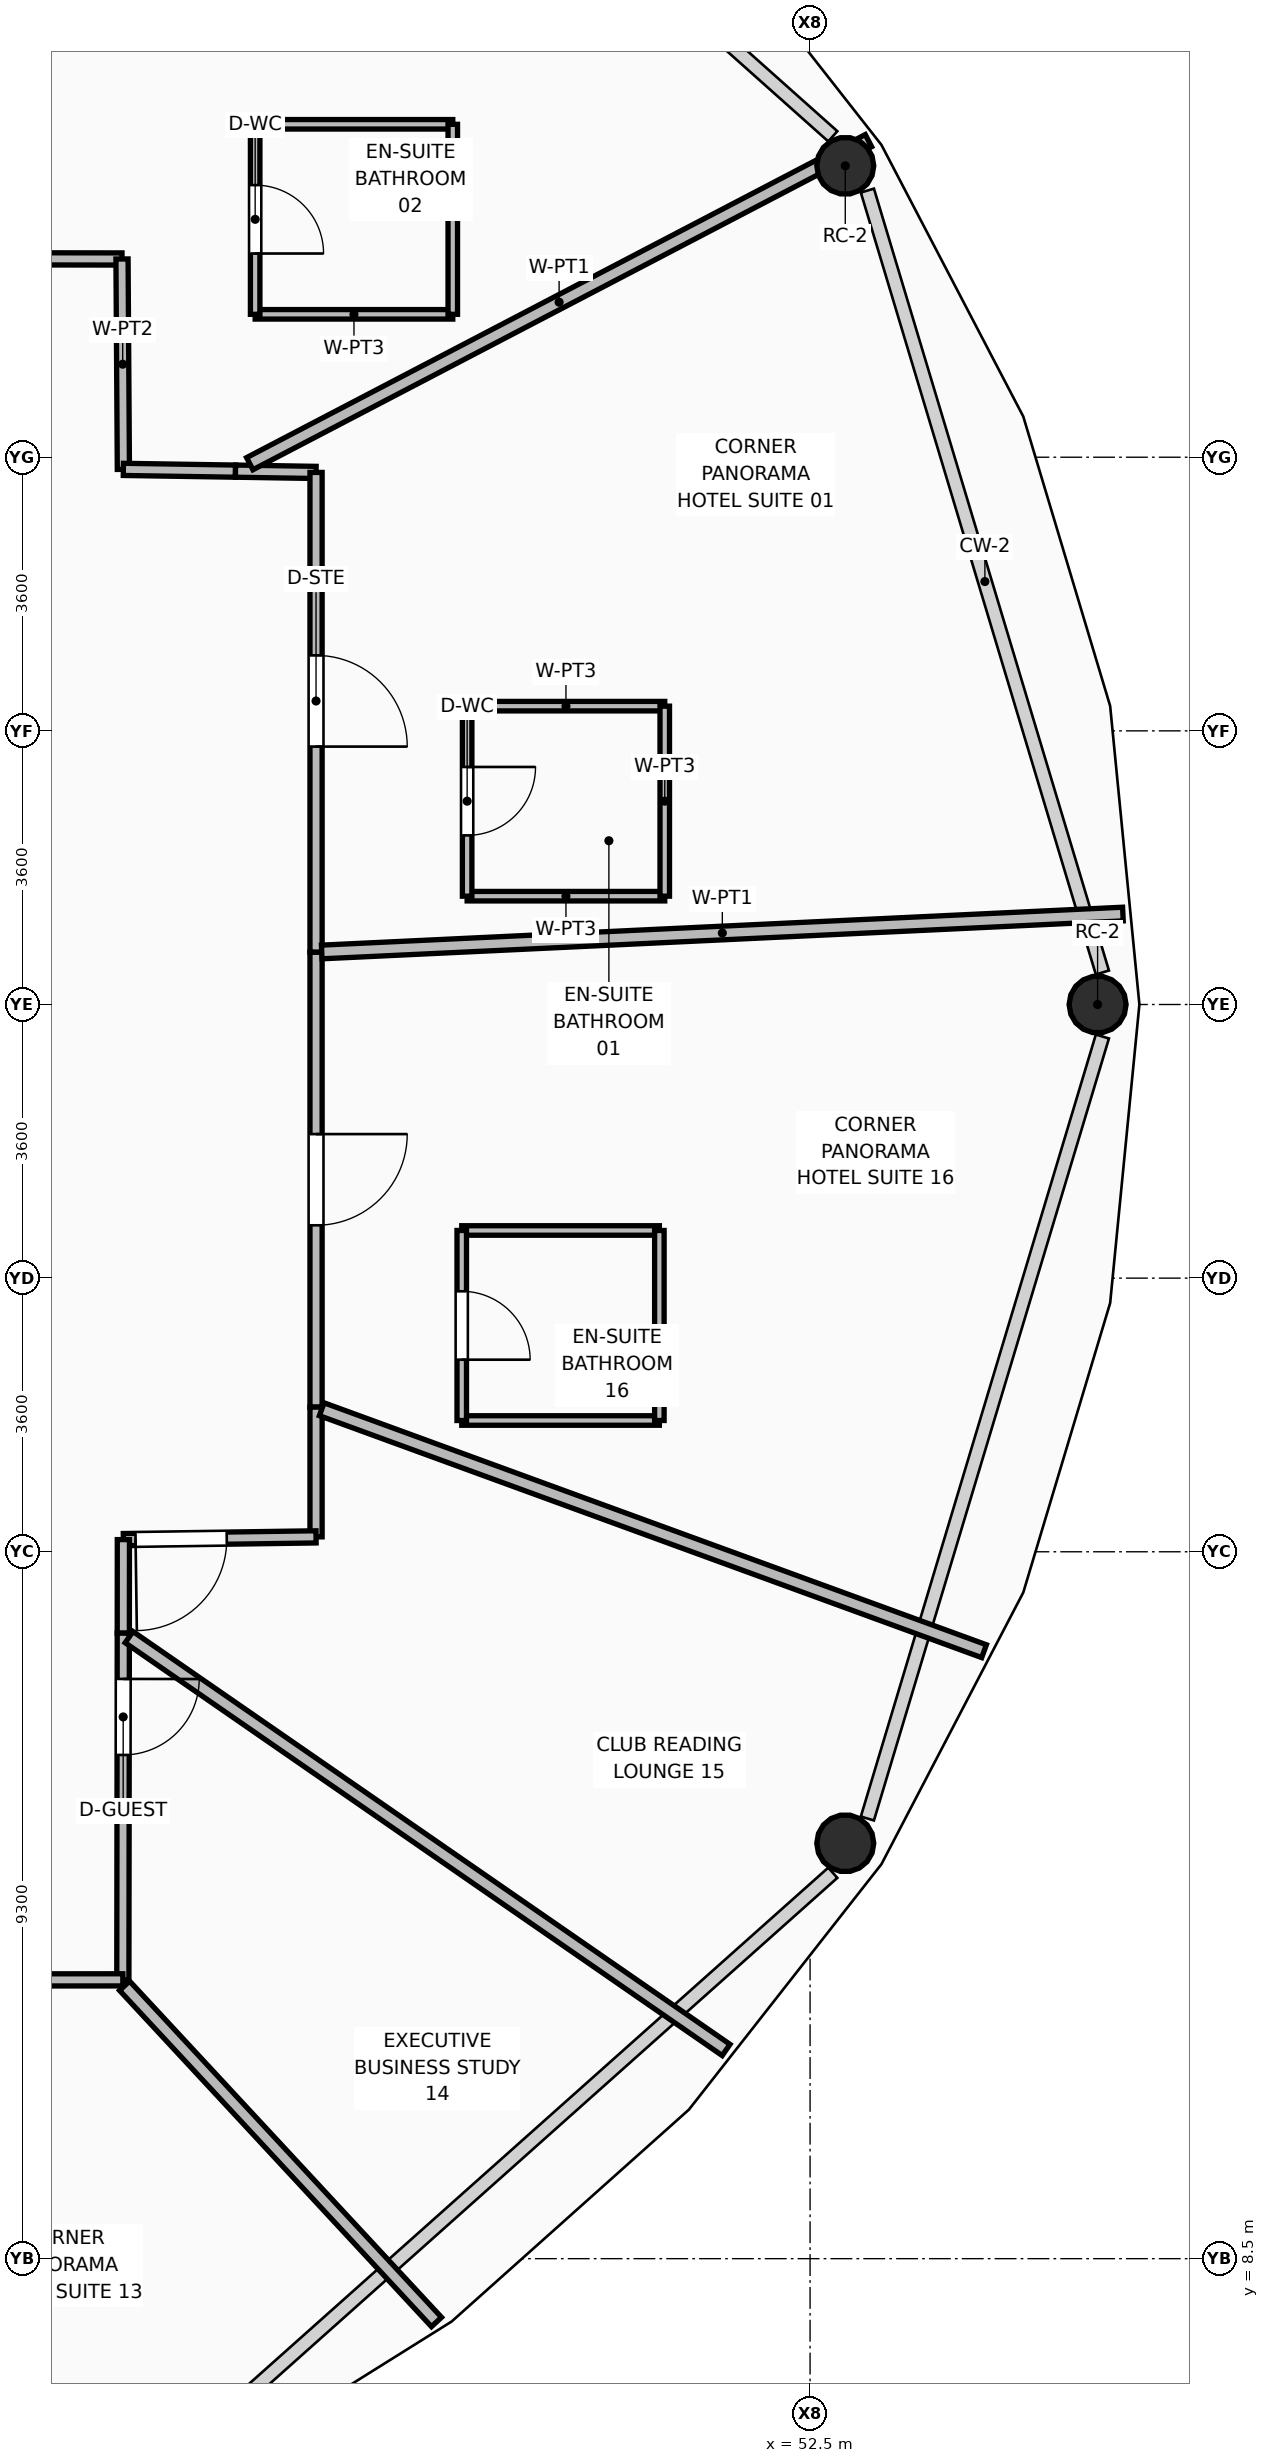
"""IFC4 building model, lengths in metres.
Left out: names, types, materials, properties, quantities, classifications, styles, units other than length and angle.
Written with IfcOpenShell. Run it as: python <this file> out.ifc"""

import sys

from ifc_helpers import new_model, si_unit, direction, frame, frame_2d, origin, origin_2d, place, context, subcontext, project, spatial, rectangle, hollow_circle, extrude, element, fill, save


model = new_model("IFC4")
c1 = context("Model", 3, precision=1e-05, world=origin(), true_north=direction((0.0, 1.0)))
c2 = subcontext(c1, "Body", "Model", "MODEL_VIEW")
j1 = project(units=[si_unit("LENGTHUNIT", "METRE"), si_unit("PLANEANGLEUNIT", "RADIAN")], contexts=[c1])
p1 = place(None, origin())
s1 = spatial("IfcSite", under=j1, at=p1, CompositionType="ELEMENT")
p2 = place(p1, origin())
s2 = spatial("IfcBuilding", under=s1, at=p2, CompositionType="ELEMENT")
p3 = place(p2, frame((0.0, 0.0, 157.2)))
s3 = spatial("IfcBuildingStorey", under=s2, at=p3, CompositionType="ELEMENT", Elevation=157.2)
for number, where, z_axis, x_axis in (
    (1, (56.283, 25.0, 0.0), (0.0, 0.0, 1.0), (1.0, 0.0, 0.0)),
    (2, (52.963, 36.034, 0.0), (0.0, 0.0, 1.0), (1.0, 0.0, 0.0)),
    (3, (52.963, 13.965, 0.0), (0.0, 0.0, 1.0), (1.0, 0.0, 0.0)),
):
    element("IfcColumn", number, at=place(p3, frame(where, z_axis=z_axis, x_axis=x_axis)), inside=s3, PredefinedType="COLUMN", context=c2, shape_type="SweptSolid", body=[
        extrude(hollow_circle(Radius=0.375, WallThickness=0.035, at=origin_2d()), origin(), (0.0, 0.0, 1.0), 3.57),
    ])
p4 = place(p3, frame((38.54, 34.815, 0.0), z_axis=(0.0, 0.0, 1.0), x_axis=(0.999999029632, -0.001393102783, 0.0)))
e4 = element("IfcWall", 4, at=p4, inside=s3, PredefinedType="PARTITIONING", context=c2, shape_type="SweptSolid", body=[
    extrude(rectangle(XDim=4.907, YDim=0.16, at=frame_2d((2.454, 0.0))), origin(), (0.0, 0.0, 1.0), 3.006),
])
p5 = place(p4, frame((0.16, 0.0, 0.0)))
e5 = element("IfcOpeningElement", 5, at=p5, cuts=e4, PredefinedType="OPENING", context=c2, shape_type="SweptSolid", body=[
    extrude(rectangle(XDim=1.2, YDim=2.1, at=frame_2d((0.6, 1.05))), frame((0.0, 0.09, 0.0), z_axis=(0.0, -1.0, 0.0), x_axis=(1.0, 0.0, 0.0)), (0.0, 0.0, 1.0), 0.18),
])
p6 = place(p3, frame((43.447, 34.808, 0.0), z_axis=(0.0, 0.0, 1.0), x_axis=(0.006526585281, -0.999978701615, 0.0)))
e6 = element("IfcWall", 6, at=p6, inside=s3, PredefinedType="PARTITIONING", context=c2, shape_type="SweptSolid", body=[
    extrude(rectangle(XDim=2.768, YDim=0.16, at=frame_2d((1.384, 0.0))), origin(), (0.0, 0.0, 1.0), 3.006),
])
p7 = place(p3, frame((43.465, 32.04, 0.0), z_axis=(0.0, 0.0, 1.0), x_axis=(0.999878959925, -0.015558454268, 0.0)))
e7 = element("IfcWall", 7, at=p7, inside=s3, PredefinedType="PARTITIONING", context=c2, shape_type="SweptSolid", body=[
    extrude(rectangle(XDim=1.475, YDim=0.16, at=frame_2d((0.738, 0.0))), origin(), (0.0, 0.0, 1.0), 3.55),
])
p8 = place(p3, frame((44.94, 32.017, 0.0), z_axis=(0.0, 0.0, 1.0), x_axis=(0.999870072285, -0.016119508305, 0.0)))
e8 = element("IfcWall", 8, at=p8, inside=s3, PredefinedType="PARTITIONING", context=c2, shape_type="SweptSolid", body=[
    extrude(rectangle(XDim=1.06, YDim=0.16, at=frame_2d((0.53, 0.0))), origin(), (0.0, 0.0, 1.0), 3.55),
])
p9 = place(p3, frame((46.0, 32.0, 0.0), z_axis=(0.0, 0.0, 1.0), x_axis=(0.0, -1.0, 0.0)))
e9 = element("IfcWall", 9, at=p9, inside=s3, PredefinedType="PARTITIONING", context=c2, shape_type="SweptSolid", body=[
    extrude(rectangle(XDim=6.313, YDim=0.16, at=frame_2d((3.156, 0.0))), origin(), (0.0, 0.0, 1.0), 3.55),
])
p10 = place(p9, frame((2.407, 0.0, 0.0)))
e10 = element("IfcOpeningElement", 10, at=p10, cuts=e9, PredefinedType="OPENING", context=c2, shape_type="SweptSolid", body=[
    extrude(rectangle(XDim=1.2, YDim=2.1, at=frame_2d((0.6, 1.05))), frame((0.0, 0.09, 0.0), z_axis=(0.0, -1.0, 0.0), x_axis=(1.0, 0.0, 0.0)), (0.0, 0.0, 1.0), 0.18),
])
p11 = place(p3, frame((46.0, 25.687, 0.0), z_axis=(0.0, 0.0, 1.0), x_axis=(0.0, -1.0, 0.0)))
e11 = element("IfcWall", 11, at=p11, inside=s3, PredefinedType="PARTITIONING", context=c2, shape_type="SweptSolid", body=[
    extrude(rectangle(XDim=5.984, YDim=0.16, at=frame_2d((2.992, 0.0))), origin(), (0.0, 0.0, 1.0), 3.006),
])
p12 = place(p11, frame((2.392, 0.0, 0.0)))
e12 = element("IfcOpeningElement", 12, at=p12, cuts=e11, PredefinedType="OPENING", context=c2, shape_type="SweptSolid", body=[
    extrude(rectangle(XDim=1.2, YDim=2.1, at=frame_2d((0.6, 1.05))), frame((0.0, 0.09, 0.0), z_axis=(0.0, -1.0, 0.0), x_axis=(1.0, 0.0, 0.0)), (0.0, 0.0, 1.0), 0.18),
])
p13 = place(p3, frame((46.0, 19.703, 0.0), z_axis=(0.0, 0.0, 1.0), x_axis=(0.0, -1.0, 0.0)))
e13 = element("IfcWall", 13, at=p13, inside=s3, PredefinedType="PARTITIONING", context=c2, shape_type="SweptSolid", body=[
    extrude(rectangle(XDim=1.707, YDim=0.16, at=frame_2d((0.854, 0.0))), origin(), (0.0, 0.0, 1.0), 3.55),
])
p14 = place(p3, frame((46.0, 17.996, 0.0), z_axis=(0.0, 0.0, 1.0), x_axis=(-0.999898426234, -0.014252621312, 0.0)))
e14 = element("IfcWall", 14, at=p14, inside=s3, PredefinedType="PARTITIONING", context=c2, shape_type="SweptSolid", body=[
    extrude(rectangle(XDim=2.535, YDim=0.16, at=frame_2d((1.268, 0.0))), origin(), (0.0, 0.0, 1.0), 3.55),
])
p15 = place(p14, frame((1.175, 0.0, 0.0)))
e15 = element("IfcOpeningElement", 15, at=p15, cuts=e14, PredefinedType="OPENING", context=c2, shape_type="SweptSolid", body=[
    extrude(rectangle(XDim=1.2, YDim=2.1, at=frame_2d((0.6, 1.05))), frame((0.0, 0.09, 0.0), z_axis=(0.0, -1.0, 0.0), x_axis=(1.0, 0.0, 0.0)), (0.0, 0.0, 1.0), 0.18),
])
p16 = place(p3, frame((43.465, 17.96, 0.0), z_axis=(0.0, 0.0, 1.0), x_axis=(-0.000793335728, -0.999999685309, 0.0)))
e16 = element("IfcWall", 16, at=p16, inside=s3, PredefinedType="PARTITIONING", context=c2, shape_type="SweptSolid", body=[
    extrude(rectangle(XDim=1.231, YDim=0.16, at=frame_2d((0.615, 0.0))), origin(), (0.0, 0.0, 1.0), 3.006),
])
p17 = place(p3, frame((43.464, 16.729, 0.0), z_axis=(0.0, 0.0, 1.0), x_axis=(-0.001338185291, -0.99999910463, 0.0)))
e17 = element("IfcWall", 17, at=p17, inside=s3, PredefinedType="PARTITIONING", context=c2, shape_type="SweptSolid", body=[
    extrude(rectangle(XDim=4.561, YDim=0.16, at=frame_2d((2.281, 0.0))), origin(), (0.0, 0.0, 1.0), 3.55),
])
p18 = place(p17, frame((0.602, 0.0, 0.0)))
e18 = element("IfcOpeningElement", 18, at=p18, cuts=e17, PredefinedType="OPENING", context=c2, shape_type="SweptSolid", body=[
    extrude(rectangle(XDim=1.0, YDim=2.1, at=frame_2d((0.5, 1.05))), frame((0.0, 0.09, 0.0), z_axis=(0.0, -1.0, 0.0), x_axis=(1.0, 0.0, 0.0)), (0.0, 0.0, 1.0), 0.18),
])
p19 = place(p3, frame((43.458, 12.168, 0.0), z_axis=(0.0, 0.0, 1.0), x_axis=(-0.99999990454, -0.000436943538, 0.0)))
e19 = element("IfcWall", 19, at=p19, inside=s3, PredefinedType="PARTITIONING", context=c2, shape_type="SweptSolid", body=[
    extrude(rectangle(XDim=8.94, YDim=0.16, at=frame_2d((4.47, 0.0))), origin(), (0.0, 0.0, 1.0), 3.006),
])
p20 = place(p19, frame((3.87, 0.0, 0.0)))
e20 = element("IfcOpeningElement", 20, at=p20, cuts=e19, PredefinedType="OPENING", context=c2, shape_type="SweptSolid", body=[
    extrude(rectangle(XDim=1.2, YDim=2.1, at=frame_2d((0.6, 1.05))), frame((0.0, 0.09, 0.0), z_axis=(0.0, -1.0, 0.0), x_axis=(1.0, 0.0, 0.0)), (0.0, 0.0, 1.0), 0.18),
])
p21 = place(p3, frame((46.075, 25.691, 0.0), z_axis=(0.0, 0.0, 1.0), x_axis=(0.998881289469, 0.04728815443, 0.0)))
e21 = element("IfcWall", 21, at=p21, inside=s3, PredefinedType="PARTITIONING", context=c2, shape_type="SweptSolid", body=[
    extrude(rectangle(XDim=10.553, YDim=0.18, at=frame_2d((5.276, 0.0))), origin(), (0.0, 0.0, 1.0), 2.852),
])
p22 = place(p3, frame((45.128, 32.115, 0.0), z_axis=(0.0, 0.0, 1.0), x_axis=(0.886452073938, 0.46282039779, 0.0)))
e22 = element("IfcWall", 22, at=p22, inside=s3, PredefinedType="PARTITIONING", context=c2, shape_type="SweptSolid", body=[
    extrude(rectangle(XDim=9.183, YDim=0.18, at=frame_2d((4.591, 0.0))), origin(), (0.0, 0.0, 1.0), 2.852),
])
p23 = place(p3, frame((38.615, 35.296, 0.0), z_axis=(0.0, 0.0, 1.0), x_axis=(0.568530950042, 0.822661873946, 0.0)))
e23 = element("IfcWall", 23, at=p23, inside=s3, PredefinedType="PARTITIONING", context=c2, shape_type="SweptSolid", body=[
    extrude(rectangle(XDim=10.735, YDim=0.18, at=frame_2d((5.367, 0.0))), origin(), (0.0, 0.0, 1.0), 2.852),
])
p24 = place(p3, frame((43.481, 12.09, 0.0), z_axis=(0.0, 0.0, 1.0), x_axis=(0.680170141703, -0.73305428062, 0.0)))
e24 = element("IfcWall", 24, at=p24, inside=s3, PredefinedType="PARTITIONING", context=c2, shape_type="SweptSolid", body=[
    extrude(rectangle(XDim=6.034, YDim=0.18, at=frame_2d((3.017, 0.0))), origin(), (0.0, 0.0, 1.0), 2.852),
])
p25 = place(p3, frame((43.54, 16.677, 0.0), z_axis=(0.0, 0.0, 1.0), x_axis=(0.822542691302, -0.568703368186, 0.0)))
e25 = element("IfcWall", 25, at=p25, inside=s3, PredefinedType="PARTITIONING", context=c2, shape_type="SweptSolid", body=[
    extrude(rectangle(XDim=9.55, YDim=0.18, at=frame_2d((4.775, 0.0))), origin(), (0.0, 0.0, 1.0), 2.852),
])
p26 = place(p3, frame((46.075, 19.675, 0.0), z_axis=(0.0, 0.0, 1.0), x_axis=(0.939296078377, -0.343107675731, 0.0)))
e26 = element("IfcWall", 26, at=p26, inside=s3, PredefinedType="PARTITIONING", context=c2, shape_type="SweptSolid", body=[
    extrude(rectangle(XDim=9.277, YDim=0.18, at=frame_2d((4.639, 0.0))), origin(), (0.0, 0.0, 1.0), 2.852),
])
for number, where, z_axis, x_axis in (
    (27, (47.988, 26.425, 0.0), (0.0, 0.0, 1.0), (1.0, 0.0, 0.0)),
    (28, (47.988, 28.925, 0.0), (0.0, 0.0, 1.0), (1.0, 0.0, 0.0)),
):
    element("IfcWall", number, at=place(p3, frame(where, z_axis=z_axis, x_axis=x_axis)), inside=s3, PredefinedType="PARTITIONING", context=c2, shape_type="SweptSolid", body=[
        extrude(rectangle(XDim=2.6, YDim=0.125, at=frame_2d((1.3, 0.0))), origin(), (0.0, 0.0, 1.0), 3.55),
    ])
p27 = place(p3, frame((47.988, 26.425, 0.0), z_axis=(0.0, 0.0, 1.0), x_axis=(0.0, 1.0, 0.0)))
e29 = element("IfcWall", 29, at=p27, inside=s3, PredefinedType="PARTITIONING", context=c2, shape_type="SweptSolid", body=[
    extrude(rectangle(XDim=2.5, YDim=0.125, at=frame_2d((1.25, 0.0))), origin(), (0.0, 0.0, 1.0), 3.55),
])
p28 = place(p27, frame((0.8, 0.0, 0.0)))
e30 = element("IfcOpeningElement", 30, at=p28, cuts=e29, PredefinedType="OPENING", context=c2, shape_type="SweptSolid", body=[
    extrude(rectangle(XDim=0.9, YDim=2.1, at=frame_2d((0.45, 1.05))), frame((0.0, 0.073, 0.0), z_axis=(0.0, -1.0, 0.0), x_axis=(1.0, 0.0, 0.0)), (0.0, 0.0, 1.0), 0.145),
])
p29 = place(p3, frame((50.588, 26.425, 0.0), z_axis=(0.0, 0.0, 1.0), x_axis=(0.0, 1.0, 0.0)))
e31 = element("IfcWall", 31, at=p29, inside=s3, PredefinedType="PARTITIONING", context=c2, shape_type="SweptSolid", body=[
    extrude(rectangle(XDim=2.5, YDim=0.125, at=frame_2d((1.25, 0.0))), origin(), (0.0, 0.0, 1.0), 3.55),
])
p30 = place(p3, frame((45.199, 34.08, 0.0), z_axis=(0.0, 0.0, 1.0), x_axis=(1.0, 0.0, 0.0)))
e32 = element("IfcWall", 32, at=p30, inside=s3, PredefinedType="PARTITIONING", context=c2, shape_type="SweptSolid", body=[
    extrude(rectangle(XDim=2.6, YDim=0.125, at=frame_2d((1.3, 0.0))), origin(), (0.0, 0.0, 1.0), 3.006),
])
p31 = place(p3, frame((45.199, 36.58, 0.0), z_axis=(0.0, 0.0, 1.0), x_axis=(1.0, 0.0, 0.0)))
e33 = element("IfcWall", 33, at=p31, inside=s3, PredefinedType="PARTITIONING", context=c2, shape_type="SweptSolid", body=[
    extrude(rectangle(XDim=2.6, YDim=0.125, at=frame_2d((1.3, 0.0))), origin(), (0.0, 0.0, 1.0), 3.55),
])
p32 = place(p3, frame((45.199, 34.08, 0.0), z_axis=(0.0, 0.0, 1.0), x_axis=(0.0, 1.0, 0.0)))
e34 = element("IfcWall", 34, at=p32, inside=s3, PredefinedType="PARTITIONING", context=c2, shape_type="SweptSolid", body=[
    extrude(rectangle(XDim=2.5, YDim=0.125, at=frame_2d((1.25, 0.0))), origin(), (0.0, 0.0, 1.0), 3.55),
])
p33 = place(p32, frame((0.8, 0.0, 0.0)))
e35 = element("IfcOpeningElement", 35, at=p33, cuts=e34, PredefinedType="OPENING", context=c2, shape_type="SweptSolid", body=[
    extrude(rectangle(XDim=0.9, YDim=2.1, at=frame_2d((0.45, 1.05))), frame((0.0, 0.073, 0.0), z_axis=(0.0, -1.0, 0.0), x_axis=(1.0, 0.0, 0.0)), (0.0, 0.0, 1.0), 0.145),
])
p34 = place(p3, frame((47.799, 34.08, 0.0), z_axis=(0.0, 0.0, 1.0), x_axis=(0.0, 1.0, 0.0)))
e36 = element("IfcWall", 36, at=p34, inside=s3, PredefinedType="PARTITIONING", context=c2, shape_type="SweptSolid", body=[
    extrude(rectangle(XDim=2.5, YDim=0.125, at=frame_2d((1.25, 0.0))), origin(), (0.0, 0.0, 1.0), 3.006),
])
for number, where, z_axis, x_axis in (
    (37, (47.917, 19.527, 0.0), (0.0, 0.0, 1.0), (1.0, 0.0, 0.0)),
    (38, (47.917, 22.027, 0.0), (0.0, 0.0, 1.0), (1.0, 0.0, 0.0)),
):
    element("IfcWall", number, at=place(p3, frame(where, z_axis=z_axis, x_axis=x_axis)), inside=s3, PredefinedType="PARTITIONING", context=c2, shape_type="SweptSolid", body=[
        extrude(rectangle(XDim=2.6, YDim=0.125, at=frame_2d((1.3, 0.0))), origin(), (0.0, 0.0, 1.0), 3.55),
    ])
p35 = place(p3, frame((47.917, 19.527, 0.0), z_axis=(0.0, 0.0, 1.0), x_axis=(0.0, 1.0, 0.0)))
e39 = element("IfcWall", 39, at=p35, inside=s3, PredefinedType="PARTITIONING", context=c2, shape_type="SweptSolid", body=[
    extrude(rectangle(XDim=2.5, YDim=0.125, at=frame_2d((1.25, 0.0))), origin(), (0.0, 0.0, 1.0), 3.55),
])
p36 = place(p35, frame((0.8, 0.0, 0.0)))
e40 = element("IfcOpeningElement", 40, at=p36, cuts=e39, PredefinedType="OPENING", context=c2, shape_type="SweptSolid", body=[
    extrude(rectangle(XDim=0.9, YDim=2.1, at=frame_2d((0.45, 1.05))), frame((0.0, 0.073, 0.0), z_axis=(0.0, -1.0, 0.0), x_axis=(1.0, 0.0, 0.0)), (0.0, 0.0, 1.0), 0.145),
])
p37 = place(p3, frame((50.517, 19.527, 0.0), z_axis=(0.0, 0.0, 1.0), x_axis=(0.0, 1.0, 0.0)))
e41 = element("IfcWall", 41, at=p37, inside=s3, PredefinedType="PARTITIONING", context=c2, shape_type="SweptSolid", body=[
    extrude(rectangle(XDim=2.5, YDim=0.125, at=frame_2d((1.25, 0.0))), origin(), (0.0, 0.0, 1.0), 3.55),
])
p38 = place(p28, frame((0.9, 0.0, 0.0), z_axis=(0.0, 0.0, 1.0), x_axis=(-1.0, 0.0, 0.0)))
e42 = element("IfcDoor", 42, at=p38, inside=s3, OperationType="SINGLE_SWING_LEFT", PredefinedType="DOOR", context=c2, shape_type="SweptSolid", body=[
    extrude(rectangle(XDim=0.9, YDim=2.1, at=frame_2d((0.45, 1.05))), frame((0.0, 0.025, 0.0), z_axis=(0.0, -1.0, 0.0), x_axis=(1.0, 0.0, 0.0)), (0.0, 0.0, 1.0), 0.05),
])
fill(e30, e42)
p39 = place(p10, origin())
e43 = element("IfcDoor", 43, at=p39, inside=s3, OperationType="SINGLE_SWING_RIGHT", PredefinedType="DOOR", context=c2, shape_type="SweptSolid", body=[
    extrude(rectangle(XDim=1.2, YDim=2.1, at=frame_2d((0.6, 1.05))), frame((0.0, 0.025, 0.0), z_axis=(0.0, -1.0, 0.0), x_axis=(1.0, 0.0, 0.0)), (0.0, 0.0, 1.0), 0.05),
])
fill(e10, e43)
p40 = place(p33, frame((0.9, 0.0, 0.0), z_axis=(0.0, 0.0, 1.0), x_axis=(-1.0, 0.0, 0.0)))
e44 = element("IfcDoor", 44, at=p40, inside=s3, OperationType="SINGLE_SWING_RIGHT", PredefinedType="DOOR", context=c2, shape_type="SweptSolid", body=[
    extrude(rectangle(XDim=0.9, YDim=2.1, at=frame_2d((0.45, 1.05))), frame((0.0, 0.025, 0.0), z_axis=(0.0, -1.0, 0.0), x_axis=(1.0, 0.0, 0.0)), (0.0, 0.0, 1.0), 0.05),
])
fill(e35, e44)
p41 = place(p18, origin())
e45 = element("IfcDoor", 45, at=p41, inside=s3, OperationType="SINGLE_SWING_LEFT", PredefinedType="DOOR", context=c2, shape_type="SweptSolid", body=[
    extrude(rectangle(XDim=1.0, YDim=2.1, at=frame_2d((0.5, 1.05))), frame((0.0, 0.025, 0.0), z_axis=(0.0, -1.0, 0.0), x_axis=(1.0, 0.0, 0.0)), (0.0, 0.0, 1.0), 0.05),
])
fill(e18, e45)
p42 = place(p15, origin())
e46 = element("IfcDoor", 46, at=p42, inside=s3, OperationType="SINGLE_SWING_RIGHT", PredefinedType="DOOR", context=c2, shape_type="SweptSolid", body=[
    extrude(rectangle(XDim=1.2, YDim=2.1, at=frame_2d((0.6, 1.05))), frame((0.0, 0.025, 0.0), z_axis=(0.0, -1.0, 0.0), x_axis=(1.0, 0.0, 0.0)), (0.0, 0.0, 1.0), 0.05),
])
fill(e15, e46)
p43 = place(p36, frame((0.9, 0.0, 0.0), z_axis=(0.0, 0.0, 1.0), x_axis=(-1.0, 0.0, 0.0)))
e47 = element("IfcDoor", 47, at=p43, inside=s3, OperationType="SINGLE_SWING_RIGHT", PredefinedType="DOOR", context=c2, shape_type="SweptSolid", body=[
    extrude(rectangle(XDim=0.9, YDim=2.1, at=frame_2d((0.45, 1.05))), frame((0.0, 0.025, 0.0), z_axis=(0.0, -1.0, 0.0), x_axis=(1.0, 0.0, 0.0)), (0.0, 0.0, 1.0), 0.05),
])
fill(e40, e47)
p44 = place(p12, origin())
e48 = element("IfcDoor", 48, at=p44, inside=s3, OperationType="SINGLE_SWING_LEFT", PredefinedType="DOOR", context=c2, shape_type="SweptSolid", body=[
    extrude(rectangle(XDim=1.2, YDim=2.1, at=frame_2d((0.6, 1.05))), frame((0.0, 0.025, 0.0), z_axis=(0.0, -1.0, 0.0), x_axis=(1.0, 0.0, 0.0)), (0.0, 0.0, 1.0), 0.05),
])
fill(e12, e48)
save(model, sys.argv[1])
